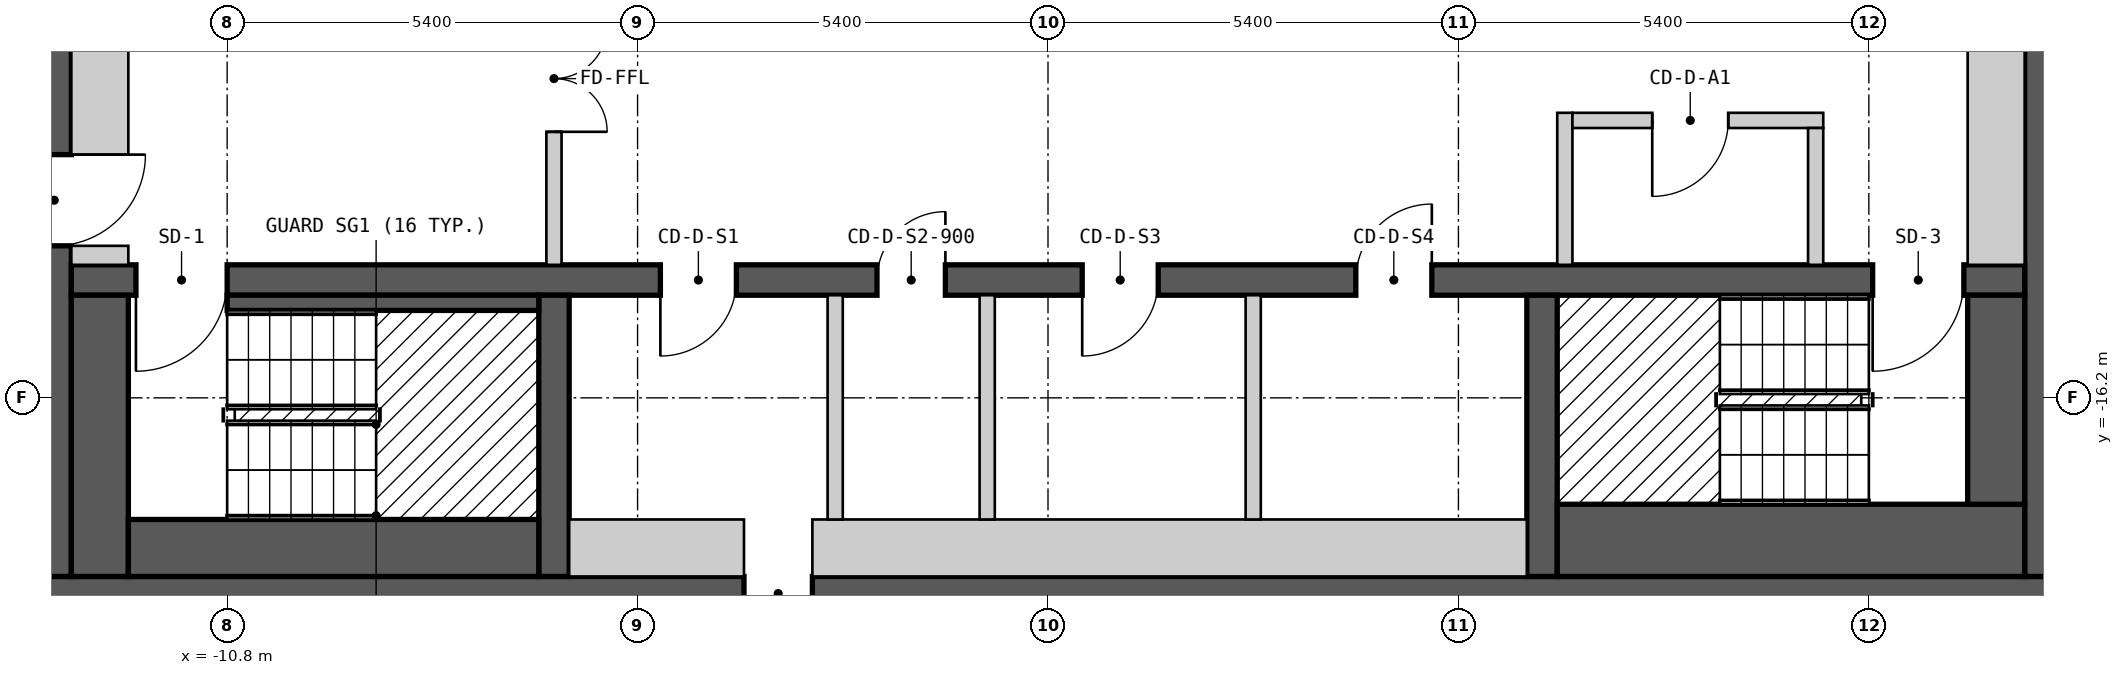
"""IFC4 building model, lengths in metres.
Left out: names, types, materials, properties, quantities, classifications, styles, units other than length and angle.
Written with IfcOpenShell. Run it as: python <this file> out.ifc"""

import sys

from ifc_helpers import new_model, si_unit, direction, frame, frame_2d, origin, place, context, subcontext, project, spatial, polyline, rectangle, outline, extrude, element, fill, save


model = new_model("IFC4")
c1 = context("Model", 3, precision=1e-05, world=origin(), true_north=direction((0.0, 1.0)))
c2 = subcontext(c1, "Body", "Model", "MODEL_VIEW")
j1 = project(units=[si_unit("LENGTHUNIT", "METRE"), si_unit("PLANEANGLEUNIT", "RADIAN")], contexts=[c1])
p1 = place(None, origin())
s1 = spatial("IfcSite", under=j1, at=p1, CompositionType="ELEMENT")
p2 = place(p1, origin())
s2 = spatial("IfcBuilding", under=s1, at=p2, CompositionType="ELEMENT")
p3 = place(p2, frame((0.0, 0.0, 220.8)))
s3 = spatial("IfcBuildingStorey", under=s2, at=p3, CompositionType="ELEMENT", Elevation=220.8)
p4 = place(p3, frame((-13.3, -18.775, 0.0), z_axis=(0.0, 0.0, 1.0), x_axis=(1.0, 0.0, 0.0)))
e1 = element("IfcWall", 1, at=p4, inside=s3, PredefinedType="SHEAR", context=c2, shape_type="SweptSolid", body=[
    extrude(rectangle(XDim=26.6, YDim=0.45, at=frame_2d((13.3, 0.0))), origin(), (0.0, 0.0, 1.0), 2.7),
])
p5 = place(p4, frame((9.3, 0.0, 0.0)))
e2 = element("IfcOpeningElement", 2, at=p5, cuts=e1, PredefinedType="OPENING", context=c2, shape_type="SweptSolid", body=[
    extrude(rectangle(XDim=0.9, YDim=2.1, at=frame_2d((0.45, 1.05))), frame((0.0, 0.235, 0.0), z_axis=(0.0, -1.0, 0.0), x_axis=(1.0, 0.0, 0.0)), (0.0, 0.0, 1.0), 0.47),
])
p6 = place(p3, frame((-13.075, -18.55, 0.0), z_axis=(0.0, 0.0, 1.0), x_axis=(0.0, 1.0, 0.0)))
e3 = element("IfcWall", 3, at=p6, inside=s3, PredefinedType="SHEAR", context=c2, shape_type="SweptSolid", body=[
    extrude(rectangle(XDim=13.1, YDim=0.45, at=frame_2d((6.55, 0.0))), origin(), (0.0, 0.0, 1.0), 2.7),
])
p7 = place(p6, frame((4.35, 0.0, 0.0)))
e4 = element("IfcOpeningElement", 4, at=p7, cuts=e3, PredefinedType="OPENING", context=c2, shape_type="SweptSolid", body=[
    extrude(rectangle(XDim=1.2, YDim=2.1, at=frame_2d((0.6, 1.05))), frame((0.0, 0.235, 0.0), z_axis=(0.0, -1.0, 0.0), x_axis=(1.0, 0.0, 0.0)), (0.0, 0.0, 1.0), 0.47),
])
p8 = place(p3, frame((13.075, -18.55, 0.0), z_axis=(0.0, 0.0, 1.0), x_axis=(0.0, 1.0, 0.0)))
e5 = element("IfcWall", 5, at=p8, inside=s3, PredefinedType="SHEAR", context=c2, shape_type="SweptSolid", body=[
    extrude(rectangle(XDim=13.1, YDim=0.45, at=frame_2d((6.55, 0.0))), origin(), (0.0, 0.0, 1.0), 2.7),
])
p9 = place(p3, frame((-12.85, -14.65, 0.0), z_axis=(0.0, 0.0, 1.0), x_axis=(1.0, 0.0, 0.0)))
e6 = element("IfcWall", 6, at=p9, inside=s3, PredefinedType="SHEAR", context=c2, shape_type="SweptSolid", body=[
    extrude(rectangle(XDim=25.7, YDim=0.4, at=frame_2d((12.85, 0.0))), origin(), (0.0, 0.0, 1.0), 2.7),
])
p10 = place(p9, frame((2.05, 0.0, 0.0), z_axis=(0.0, 0.0, 1.0), x_axis=(-1.0, 0.0, 0.0)))
e7 = element("IfcOpeningElement", 7, at=p10, cuts=e6, PredefinedType="OPENING", context=c2, shape_type="SweptSolid", body=[
    extrude(rectangle(XDim=1.2, YDim=2.1, at=frame_2d((0.6, 1.05))), frame((0.0, 0.21, 0.0), z_axis=(0.0, -1.0, 0.0), x_axis=(1.0, 0.0, 0.0)), (0.0, 0.0, 1.0), 0.42),
])
p11 = place(p9, frame((24.9, 0.0, 0.0), z_axis=(0.0, 0.0, 1.0), x_axis=(-1.0, 0.0, 0.0)))
e8 = element("IfcOpeningElement", 8, at=p11, cuts=e6, PredefinedType="OPENING", context=c2, shape_type="SweptSolid", body=[
    extrude(rectangle(XDim=1.2, YDim=2.1, at=frame_2d((0.6, 1.05))), frame((0.0, 0.21, 0.0), z_axis=(0.0, -1.0, 0.0), x_axis=(1.0, 0.0, 0.0)), (0.0, 0.0, 1.0), 0.42),
])
p12 = place(p9, frame((8.75, 0.0, 0.0), z_axis=(0.0, 0.0, 1.0), x_axis=(-1.0, 0.0, 0.0)))
e9 = element("IfcOpeningElement", 9, at=p12, cuts=e6, PredefinedType="OPENING", context=c2, shape_type="SweptSolid", body=[
    extrude(rectangle(XDim=1.0, YDim=2.1, at=frame_2d((0.5, 1.05))), frame((0.0, 0.21, 0.0), z_axis=(0.0, -1.0, 0.0), x_axis=(1.0, 0.0, 0.0)), (0.0, 0.0, 1.0), 0.42),
])
p13 = place(p9, frame((11.5, 0.0, 0.0), z_axis=(0.0, 0.0, 1.0), x_axis=(-1.0, 0.0, 0.0)))
e10 = element("IfcOpeningElement", 10, at=p13, cuts=e6, PredefinedType="OPENING", context=c2, shape_type="SweptSolid", body=[
    extrude(rectangle(XDim=0.9, YDim=2.1, at=frame_2d((0.45, 1.05))), frame((0.0, 0.21, 0.0), z_axis=(0.0, -1.0, 0.0), x_axis=(1.0, 0.0, 0.0)), (0.0, 0.0, 1.0), 0.42),
])
p14 = place(p9, frame((14.3, 0.0, 0.0), z_axis=(0.0, 0.0, 1.0), x_axis=(-1.0, 0.0, 0.0)))
e11 = element("IfcOpeningElement", 11, at=p14, cuts=e6, PredefinedType="OPENING", context=c2, shape_type="SweptSolid", body=[
    extrude(rectangle(XDim=1.0, YDim=2.1, at=frame_2d((0.5, 1.05))), frame((0.0, 0.21, 0.0), z_axis=(0.0, -1.0, 0.0), x_axis=(1.0, 0.0, 0.0)), (0.0, 0.0, 1.0), 0.42),
])
p15 = place(p9, frame((17.9, 0.0, 0.0), z_axis=(0.0, 0.0, 1.0), x_axis=(-1.0, 0.0, 0.0)))
e12 = element("IfcOpeningElement", 12, at=p15, cuts=e6, PredefinedType="OPENING", context=c2, shape_type="SweptSolid", body=[
    extrude(rectangle(XDim=1.0, YDim=2.1, at=frame_2d((0.5, 1.05))), frame((0.0, 0.21, 0.0), z_axis=(0.0, -1.0, 0.0), x_axis=(1.0, 0.0, 0.0)), (0.0, 0.0, 1.0), 0.42),
])
for number, where, z_axis, x_axis in (
    (13, (-6.5, -18.55, 0.0), (0.0, 0.0, 1.0), (0.0, 1.0, 0.0)),
    (14, (6.5, -18.55, 0.0), (0.0, 0.0, 1.0), (0.0, 1.0, 0.0)),
):
    element("IfcWall", number, at=place(p3, frame(where, z_axis=z_axis, x_axis=x_axis)), inside=s3, PredefinedType="SHEAR", context=c2, shape_type="SweptSolid", body=[
        extrude(rectangle(XDim=3.7, YDim=0.4, at=frame_2d((1.85, 0.0))), origin(), (0.0, 0.0, 1.0), 2.7),
    ])
p16 = place(p3, frame((-15.34, -18.37, 0.0), z_axis=(0.0, 0.0, 1.0), x_axis=(0.866022959057, -0.500004234368, 0.0)))
e15 = element("IfcWall", 15, at=p16, inside=s3, PredefinedType="SOLIDWALL", context=c2, shape_type="SweptSolid", body=[
    extrude(outline(polyline([(0.0, -0.15), (5.0, -0.15), (4.92, 0.15), (0.08, 0.15), (0.0, -0.15)])), origin(), (0.0, 0.0, 1.0), 2.7),
])
p17 = place(p16, frame((0.65, 0.0, 0.15)))
e16 = element("IfcOpeningElement", 16, at=p17, cuts=e15, PredefinedType="OPENING", context=c2, shape_type="SweptSolid", body=[
    extrude(rectangle(XDim=1.2, YDim=2.1, at=frame_2d((0.6, 1.05))), frame((0.0, 0.16, 0.0), z_axis=(0.0, -1.0, 0.0), x_axis=(1.0, 0.0, 0.0)), (0.0, 0.0, 1.0), 0.32),
])
p18 = place(p16, frame((3.15, 0.0, 0.15)))
e17 = element("IfcOpeningElement", 17, at=p18, cuts=e15, PredefinedType="OPENING", context=c2, shape_type="SweptSolid", body=[
    extrude(rectangle(XDim=1.2, YDim=2.1, at=frame_2d((0.6, 1.05))), frame((0.0, 0.16, 0.0), z_axis=(0.0, -1.0, 0.0), x_axis=(1.0, 0.0, 0.0)), (0.0, 0.0, 1.0), 0.32),
])
p19 = place(p3, frame((11.01, -20.87, 0.0), z_axis=(0.0, 0.0, 1.0), x_axis=(0.866022959057, 0.500004234368, 0.0)))
e18 = element("IfcWall", 18, at=p19, inside=s3, PredefinedType="SOLIDWALL", context=c2, shape_type="SweptSolid", body=[
    extrude(outline(polyline([(0.0, -0.15), (5.0, -0.15), (4.92, 0.15), (0.08, 0.15), (0.0, -0.15)])), origin(), (0.0, 0.0, 1.0), 2.7),
])
p20 = place(p19, frame((0.65, 0.0, 0.15)))
e19 = element("IfcOpeningElement", 19, at=p20, cuts=e18, PredefinedType="OPENING", context=c2, shape_type="SweptSolid", body=[
    extrude(rectangle(XDim=1.2, YDim=2.1, at=frame_2d((0.6, 1.05))), frame((0.0, 0.16, 0.0), z_axis=(0.0, -1.0, 0.0), x_axis=(1.0, 0.0, 0.0)), (0.0, 0.0, 1.0), 0.32),
])
p21 = place(p19, frame((3.149, 0.0, 0.15)))
e20 = element("IfcOpeningElement", 20, at=p21, cuts=e18, PredefinedType="OPENING", context=c2, shape_type="SweptSolid", body=[
    extrude(rectangle(XDim=1.2, YDim=2.1, at=frame_2d((0.6, 1.05))), frame((0.0, 0.16, 0.0), z_axis=(0.0, -1.0, 0.0), x_axis=(1.0, 0.0, 0.0)), (0.0, 0.0, 1.0), 0.32),
])
p22 = place(p3, frame((-12.475, -18.55, 0.0), z_axis=(0.0, 0.0, 1.0), x_axis=(0.0, 1.0, 0.0)))
e21 = element("IfcWall", 21, at=p22, inside=s3, PredefinedType="SOLIDWALL", context=c2, shape_type="SweptSolid", body=[
    extrude(rectangle(XDim=3.7, YDim=0.75, at=frame_2d((1.85, 0.0))), origin(), (0.0, 0.0, 1.0), 2.7),
])
p23 = place(p3, frame((-12.85, -14.325, 0.0), z_axis=(0.0, 0.0, 1.0), x_axis=(1.0, 0.0, 0.0)))
e22 = element("IfcWall", 22, at=p23, inside=s3, PredefinedType="PARTITIONING", context=c2, shape_type="SweptSolid", body=[
    extrude(rectangle(XDim=0.75, YDim=0.25, at=frame_2d((0.375, 0.0))), origin(), (0.0, 0.0, 1.0), 2.7),
])
p24 = place(p3, frame((-12.475, -13.0, 0.0), z_axis=(0.0, 0.0, 1.0), x_axis=(0.0, 1.0, 0.0)))
e23 = element("IfcWall", 23, at=p24, inside=s3, PredefinedType="PARTITIONING", context=c2, shape_type="SweptSolid", body=[
    extrude(rectangle(XDim=3.45, YDim=0.75, at=frame_2d((1.725, 0.0))), origin(), (0.0, 0.0, 1.0), 2.7),
])
p25 = place(p3, frame((-12.1, -18.175, 0.0), z_axis=(0.0, 0.0, 1.0), x_axis=(1.0, 0.0, 0.0)))
e24 = element("IfcWall", 24, at=p25, inside=s3, PredefinedType="SOLIDWALL", context=c2, shape_type="SweptSolid", body=[
    extrude(rectangle(XDim=5.4, YDim=0.75, at=frame_2d((2.7, 0.0))), origin(), (0.0, 0.0, 1.0), 2.7),
])
p26 = place(p3, frame((-10.8, -14.95, 0.0), z_axis=(0.0, 0.0, 1.0), x_axis=(1.0, 0.0, 0.0)))
e25 = element("IfcWall", 25, at=p26, inside=s3, PredefinedType="SOLIDWALL", context=c2, shape_type="SweptSolid", body=[
    extrude(rectangle(XDim=4.1, YDim=0.2, at=frame_2d((2.05, 0.0))), origin(), (0.0, 0.0, 1.0), 2.7),
])
p27 = place(p3, frame((-6.5, -14.45, 0.0), z_axis=(0.0, 0.0, 1.0), x_axis=(0.0, 1.0, 0.0)))
e26 = element("IfcWall", 26, at=p27, inside=s3, PredefinedType="PARTITIONING", context=c2, shape_type="SweptSolid", body=[
    extrude(rectangle(XDim=4.9, YDim=0.2, at=frame_2d((2.45, 0.0))), origin(), (0.0, 0.0, 1.0), 2.7),
])
p28 = place(p27, frame((3.15, 0.0, 0.0), z_axis=(0.0, 0.0, 1.0), x_axis=(-1.0, 0.0, 0.0)))
e27 = element("IfcOpeningElement", 27, at=p28, cuts=e26, PredefinedType="OPENING", context=c2, shape_type="SweptSolid", body=[
    extrude(rectangle(XDim=1.4, YDim=2.1, at=frame_2d((0.7, 1.05))), frame((0.0, 0.11, 0.0), z_axis=(0.0, -1.0, 0.0), x_axis=(1.0, 0.0, 0.0)), (0.0, 0.0, 1.0), 0.22),
])
p29 = place(p3, frame((-6.3, -18.175, 0.0), z_axis=(0.0, 0.0, 1.0), x_axis=(1.0, 0.0, 0.0)))
e28 = element("IfcWall", 28, at=p29, inside=s3, PredefinedType="PARTITIONING", context=c2, shape_type="SweptSolid", body=[
    extrude(rectangle(XDim=2.3, YDim=0.75, at=frame_2d((1.15, 0.0))), origin(), (0.0, 0.0, 1.0), 2.7),
])
p30 = place(p3, frame((-3.1, -18.175, 0.0), z_axis=(0.0, 0.0, 1.0), x_axis=(1.0, 0.0, 0.0)))
e29 = element("IfcWall", 29, at=p30, inside=s3, PredefinedType="PARTITIONING", context=c2, shape_type="SweptSolid", body=[
    extrude(rectangle(XDim=9.4, YDim=0.75, at=frame_2d((4.7, 0.0))), origin(), (0.0, 0.0, 1.0), 2.7),
])
for number, where, z_axis, x_axis in (
    (30, (-2.8, -17.8, 0.0), (0.0, 0.0, 1.0), (0.0, 1.0, 0.0)),
    (31, (-0.8, -17.8, 0.0), (0.0, 0.0, 1.0), (0.0, 1.0, 0.0)),
    (32, (2.7, -17.8, 0.0), (0.0, 0.0, 1.0), (0.0, 1.0, 0.0)),
):
    element("IfcWall", number, at=place(p3, frame(where, z_axis=z_axis, x_axis=x_axis)), inside=s3, PredefinedType="PARTITIONING", context=c2, shape_type="SweptSolid", body=[
        extrude(rectangle(XDim=2.95, YDim=0.2, at=frame_2d((1.475, 0.0))), origin(), (0.0, 0.0, 1.0), 2.7),
    ])
p31 = place(p3, frame((6.7, -18.075, 0.0), z_axis=(0.0, 0.0, 1.0), x_axis=(1.0, 0.0, 0.0)))
e33 = element("IfcWall", 33, at=p31, inside=s3, PredefinedType="SOLIDWALL", context=c2, shape_type="SweptSolid", body=[
    extrude(rectangle(XDim=6.15, YDim=0.95, at=frame_2d((3.075, 0.0))), origin(), (0.0, 0.0, 1.0), 2.7),
])
p32 = place(p3, frame((6.8, -14.45, 0.0), z_axis=(0.0, 0.0, 1.0), x_axis=(0.0, 1.0, 0.0)))
e34 = element("IfcWall", 34, at=p32, inside=s3, PredefinedType="PARTITIONING", context=c2, shape_type="SweptSolid", body=[
    extrude(rectangle(XDim=2.0, YDim=0.2, at=frame_2d((1.0, 0.0))), origin(), (0.0, 0.0, 1.0), 2.7),
])
p33 = place(p3, frame((6.9, -12.55, 0.0), z_axis=(0.0, 0.0, 1.0), x_axis=(1.0, 0.0, 0.0)))
e35 = element("IfcWall", 35, at=p33, inside=s3, PredefinedType="PARTITIONING", context=c2, shape_type="SweptSolid", body=[
    extrude(rectangle(XDim=3.3, YDim=0.2, at=frame_2d((1.65, 0.0))), origin(), (0.0, 0.0, 1.0), 2.7),
])
p34 = place(p33, frame((2.05, 0.0, 0.0), z_axis=(0.0, 0.0, 1.0), x_axis=(-1.0, 0.0, 0.0)))
e36 = element("IfcOpeningElement", 36, at=p34, cuts=e35, PredefinedType="OPENING", context=c2, shape_type="SweptSolid", body=[
    extrude(rectangle(XDim=1.0, YDim=2.1, at=frame_2d((0.5, 1.05))), frame((0.0, 0.11, 0.0), z_axis=(0.0, -1.0, 0.0), x_axis=(1.0, 0.0, 0.0)), (0.0, 0.0, 1.0), 0.22),
])
p35 = place(p3, frame((10.1, -14.45, 0.0), z_axis=(0.0, 0.0, 1.0), x_axis=(0.0, 1.0, 0.0)))
e37 = element("IfcWall", 37, at=p35, inside=s3, PredefinedType="PARTITIONING", context=c2, shape_type="SweptSolid", body=[
    extrude(rectangle(XDim=1.8, YDim=0.2, at=frame_2d((0.9, 0.0))), origin(), (0.0, 0.0, 1.0), 2.7),
])
p36 = place(p3, frame((12.475, -17.6, 0.0), z_axis=(0.0, 0.0, 1.0), x_axis=(0.0, 1.0, 0.0)))
e38 = element("IfcWall", 38, at=p36, inside=s3, PredefinedType="SOLIDWALL", context=c2, shape_type="SweptSolid", body=[
    extrude(rectangle(XDim=2.75, YDim=0.75, at=frame_2d((1.375, 0.0))), origin(), (0.0, 0.0, 1.0), 2.7),
])
p37 = place(p3, frame((12.475, -14.45, 0.0), z_axis=(0.0, 0.0, 1.0), x_axis=(0.0, 1.0, 0.0)))
e39 = element("IfcWall", 39, at=p37, inside=s3, PredefinedType="PARTITIONING", context=c2, shape_type="SweptSolid", body=[
    extrude(rectangle(XDim=8.25, YDim=0.75, at=frame_2d((4.125, 0.0))), origin(), (0.0, 0.0, 1.0), 2.7),
])
p38 = place(p10, origin())
e40 = element("IfcDoor", 40, at=p38, inside=s3, OperationType="SINGLE_SWING_RIGHT", PredefinedType="DOOR", context=c2, shape_type="SweptSolid", body=[
    extrude(rectangle(XDim=1.2, YDim=2.1, at=frame_2d((0.6, 1.05))), frame((0.0, 0.025, 0.0), z_axis=(0.0, -1.0, 0.0), x_axis=(1.0, 0.0, 0.0)), (0.0, 0.0, 1.0), 0.05),
])
fill(e7, e40)
p39 = place(p11, origin())
e41 = element("IfcDoor", 41, at=p39, inside=s3, OperationType="SINGLE_SWING_RIGHT", PredefinedType="DOOR", context=c2, shape_type="SweptSolid", body=[
    extrude(rectangle(XDim=1.2, YDim=2.1, at=frame_2d((0.6, 1.05))), frame((0.0, 0.025, 0.0), z_axis=(0.0, -1.0, 0.0), x_axis=(1.0, 0.0, 0.0)), (0.0, 0.0, 1.0), 0.05),
])
fill(e8, e41)
p40 = place(p7, origin())
e42 = element("IfcDoor", 42, at=p40, inside=s3, OperationType="SINGLE_SWING_RIGHT", PredefinedType="DOOR", context=c2, shape_type="SweptSolid", body=[
    extrude(rectangle(XDim=1.2, YDim=2.1, at=frame_2d((0.6, 1.05))), frame((0.0, 0.025, 0.0), z_axis=(0.0, -1.0, 0.0), x_axis=(1.0, 0.0, 0.0)), (0.0, 0.0, 1.0), 0.05),
])
fill(e4, e42)
p41 = place(p28, origin())
e43 = element("IfcDoor", 43, at=p41, inside=s3, OperationType="DOUBLE_DOOR_SINGLE_SWING", PredefinedType="DOOR", context=c2, shape_type="SweptSolid", body=[
    extrude(rectangle(XDim=1.4, YDim=2.1, at=frame_2d((0.7, 1.05))), frame((0.0, 0.025, 0.0), z_axis=(0.0, -1.0, 0.0), x_axis=(1.0, 0.0, 0.0)), (0.0, 0.0, 1.0), 0.05),
])
fill(e27, e43)
p42 = place(p34, origin())
e44 = element("IfcDoor", 44, at=p42, inside=s3, OperationType="SINGLE_SWING_RIGHT", PredefinedType="DOOR", context=c2, shape_type="SweptSolid", body=[
    extrude(rectangle(XDim=1.0, YDim=2.1, at=frame_2d((0.5, 1.05))), frame((0.0, 0.025, 0.0), z_axis=(0.0, -1.0, 0.0), x_axis=(1.0, 0.0, 0.0)), (0.0, 0.0, 1.0), 0.05),
])
fill(e36, e44)
p43 = place(p12, origin())
e45 = element("IfcDoor", 45, at=p43, inside=s3, OperationType="SINGLE_SWING_RIGHT", PredefinedType="DOOR", context=c2, shape_type="SweptSolid", body=[
    extrude(rectangle(XDim=1.0, YDim=2.1, at=frame_2d((0.5, 1.05))), frame((0.0, 0.025, 0.0), z_axis=(0.0, -1.0, 0.0), x_axis=(1.0, 0.0, 0.0)), (0.0, 0.0, 1.0), 0.05),
])
fill(e9, e45)
p44 = place(p13, origin())
e46 = element("IfcDoor", 46, at=p44, inside=s3, OperationType="SINGLE_SWING_LEFT", PredefinedType="DOOR", context=c2, shape_type="SweptSolid", body=[
    extrude(rectangle(XDim=0.9, YDim=2.1, at=frame_2d((0.45, 1.05))), frame((0.0, 0.025, 0.0), z_axis=(0.0, -1.0, 0.0), x_axis=(1.0, 0.0, 0.0)), (0.0, 0.0, 1.0), 0.05),
])
fill(e10, e46)
p45 = place(p14, origin())
e47 = element("IfcDoor", 47, at=p45, inside=s3, OperationType="SINGLE_SWING_RIGHT", PredefinedType="DOOR", context=c2, shape_type="SweptSolid", body=[
    extrude(rectangle(XDim=1.0, YDim=2.1, at=frame_2d((0.5, 1.05))), frame((0.0, 0.025, 0.0), z_axis=(0.0, -1.0, 0.0), x_axis=(1.0, 0.0, 0.0)), (0.0, 0.0, 1.0), 0.05),
])
fill(e11, e47)
p46 = place(p15, origin())
e48 = element("IfcDoor", 48, at=p46, inside=s3, OperationType="SINGLE_SWING_LEFT", PredefinedType="DOOR", context=c2, shape_type="SweptSolid", body=[
    extrude(rectangle(XDim=1.0, YDim=2.1, at=frame_2d((0.5, 1.05))), frame((0.0, 0.025, 0.0), z_axis=(0.0, -1.0, 0.0), x_axis=(1.0, 0.0, 0.0)), (0.0, 0.0, 1.0), 0.05),
])
fill(e12, e48)
p47 = place(p5, origin())
e49 = element("IfcDoor", 49, at=p47, inside=s3, OperationType="SINGLE_SWING_RIGHT", PredefinedType="DOOR", context=c2, shape_type="SweptSolid", body=[
    extrude(rectangle(XDim=0.9, YDim=2.1, at=frame_2d((0.45, 1.05))), frame((0.0, 0.025, 0.0), z_axis=(0.0, -1.0, 0.0), x_axis=(1.0, 0.0, 0.0)), (0.0, 0.0, 1.0), 0.05),
])
fill(e2, e49)
save(model, sys.argv[1])
